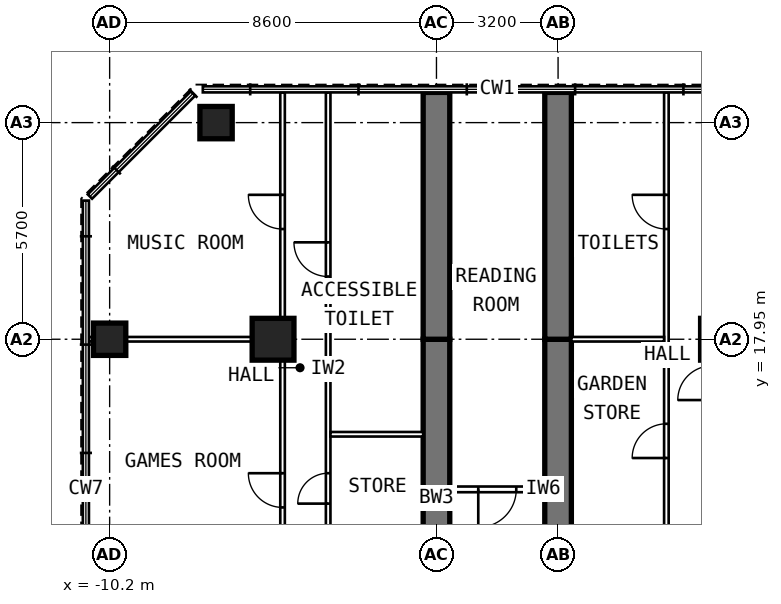
"""IFC4 building model, lengths in metres.
Left out: names, types, materials, properties, quantities, classifications, styles, units other than length and angle.
Written with IfcOpenShell. Run it as: python <this file> out.ifc"""

import sys

from ifc_helpers import new_model, si_unit, direction, frame, frame_2d, origin, origin_2d, place, context, subcontext, project, spatial, rectangle, extrude, element, fill, save


model = new_model("IFC4")
c1 = context("Model", 3, precision=1e-05, world=origin(), true_north=direction((0.0, 1.0)))
c2 = subcontext(c1, "Body", "Model", "MODEL_VIEW")
j1 = project(units=[si_unit("LENGTHUNIT", "METRE"), si_unit("PLANEANGLEUNIT", "RADIAN")], contexts=[c1])
p1 = place(None, origin())
s1 = spatial("IfcSite", under=j1, at=p1, CompositionType="ELEMENT")
p2 = place(p1, origin())
s2 = spatial("IfcBuilding", under=s1, at=p2, CompositionType="ELEMENT")
p3 = place(p2, frame((0.0, 0.0, 226.2)))
s3 = spatial("IfcBuildingStorey", under=s2, at=p3, CompositionType="ELEMENT", Elevation=226.2)
for number, where, z_axis, x_axis in (
    (1, (-10.2, 17.95, 0.0), (0.0, 0.0, 1.0), (0.0, 1.0, 0.0)),
    (2, (-7.4, 23.65, 0.0), (0.0, 0.0, 1.0), (0.0, 1.0, 0.0)),
):
    element("IfcColumn", number, at=place(p3, frame(where, z_axis=z_axis, x_axis=x_axis)), inside=s3, PredefinedType="COLUMN", context=c2, shape_type="SweptSolid", body=[
        extrude(rectangle(XDim=0.85, YDim=0.85, at=origin_2d()), origin(), (0.0, 0.0, 1.0), 5.4),
    ])
for number, where, z_axis, x_axis in (
    (3, (-5.9, 17.95, 0.0), (0.0, 0.0, 1.0), (0.0, 1.0, 0.0)),
    (4, (5.9, 17.95, 0.0), (0.0, 0.0, 1.0), (0.0, 1.0, 0.0)),
):
    element("IfcColumn", number, at=place(p3, frame(where, z_axis=z_axis, x_axis=x_axis)), inside=s3, PredefinedType="COLUMN", context=c2, shape_type="SweptSolid", body=[
        extrude(rectangle(XDim=1.1, YDim=1.1, at=origin_2d()), origin(), (0.0, 0.0, 1.0), 5.4),
    ])
p4 = place(p3, frame((-1.6, 9.6, 0.0), z_axis=(0.0, 0.0, 1.0), x_axis=(0.0, 1.0, 0.0)))
e5 = element("IfcWall", 5, at=p4, inside=s3, PredefinedType="SHEAR", context=c2, shape_type="SweptSolid", body=[
    extrude(rectangle(XDim=8.35, YDim=0.7, at=frame_2d((4.175, 0.0))), origin(), (0.0, 0.0, 1.0), 5.4),
])
p5 = place(p4, frame((1.3, 0.0, 0.0)))
e6 = element("IfcOpeningElement", 6, at=p5, cuts=e5, PredefinedType="OPENING", context=c2, shape_type="SweptSolid", body=[
    extrude(rectangle(XDim=1.0, YDim=2.1, at=frame_2d((0.5, 1.05))), frame((0.0, 0.362, 0.0), z_axis=(0.0, -1.0, 0.0), x_axis=(1.0, 0.0, 0.0)), (0.0, 0.0, 1.0), 0.724),
])
p6 = place(p3, frame((-1.6, 17.95, 0.0), z_axis=(0.0, 0.0, 1.0), x_axis=(0.0, 1.0, 0.0)))
e7 = element("IfcWall", 7, at=p6, inside=s3, PredefinedType="SHEAR", context=c2, shape_type="SweptSolid", body=[
    extrude(rectangle(XDim=6.495, YDim=0.7, at=frame_2d((3.248, 0.0))), origin(), (0.0, 0.0, 1.0), 5.4),
])
p7 = place(p3, frame((1.6, 9.6, 0.0), z_axis=(0.0, 0.0, 1.0), x_axis=(0.0, 1.0, 0.0)))
e8 = element("IfcWall", 8, at=p7, inside=s3, PredefinedType="SHEAR", context=c2, shape_type="SweptSolid", body=[
    extrude(rectangle(XDim=8.35, YDim=0.7, at=frame_2d((4.175, 0.0))), origin(), (0.0, 0.0, 1.0), 5.4),
])
p8 = place(p7, frame((1.3, 0.0, 0.0)))
e9 = element("IfcOpeningElement", 9, at=p8, cuts=e8, PredefinedType="OPENING", context=c2, shape_type="SweptSolid", body=[
    extrude(rectangle(XDim=1.0, YDim=2.1, at=frame_2d((0.5, 1.05))), frame((0.0, 0.362, 0.0), z_axis=(0.0, -1.0, 0.0), x_axis=(1.0, 0.0, 0.0)), (0.0, 0.0, 1.0), 0.724),
])
p9 = place(p3, frame((1.6, 17.95, 0.0), z_axis=(0.0, 0.0, 1.0), x_axis=(0.0, 1.0, 0.0)))
e10 = element("IfcWall", 10, at=p9, inside=s3, PredefinedType="SHEAR", context=c2, shape_type="SweptSolid", body=[
    extrude(rectangle(XDim=6.495, YDim=0.7, at=frame_2d((3.248, 0.0))), origin(), (0.0, 0.0, 1.0), 5.4),
])
p10 = place(p3, frame((-4.45, 9.9, 0.0), z_axis=(0.0, 0.0, 1.0), x_axis=(0.0, 1.0, 0.0)))
e11 = element("IfcWall", 11, at=p10, inside=s3, PredefinedType="PARTITIONING", context=c2, shape_type="SweptSolid", body=[
    extrude(rectangle(XDim=14.545, YDim=0.12, at=frame_2d((7.272, 0.0))), origin(), (0.0, 0.0, 1.0), 5.15),
])
p11 = place(p10, frame((1.55, 0.0, 0.0)))
e12 = element("IfcOpeningElement", 12, at=p11, cuts=e11, PredefinedType="OPENING", context=c2, shape_type="SweptSolid", body=[
    extrude(rectangle(XDim=0.9, YDim=2.1, at=frame_2d((0.45, 1.05))), frame((0.0, 0.072, 0.0), z_axis=(0.0, -1.0, 0.0), x_axis=(1.0, 0.0, 0.0)), (0.0, 0.0, 1.0), 0.144),
])
p12 = place(p10, frame((3.725, 0.0, 0.0)))
e13 = element("IfcOpeningElement", 13, at=p12, cuts=e11, PredefinedType="OPENING", context=c2, shape_type="SweptSolid", body=[
    extrude(rectangle(XDim=0.8, YDim=2.1, at=frame_2d((0.4, 1.05))), frame((0.0, 0.072, 0.0), z_axis=(0.0, -1.0, 0.0), x_axis=(1.0, 0.0, 0.0)), (0.0, 0.0, 1.0), 0.144),
])
p13 = place(p10, frame((9.7, 0.0, 0.0)))
e14 = element("IfcOpeningElement", 14, at=p13, cuts=e11, PredefinedType="OPENING", context=c2, shape_type="SweptSolid", body=[
    extrude(rectangle(XDim=0.9, YDim=2.1, at=frame_2d((0.45, 1.05))), frame((0.0, 0.072, 0.0), z_axis=(0.0, -1.0, 0.0), x_axis=(1.0, 0.0, 0.0)), (0.0, 0.0, 1.0), 0.144),
])
p14 = place(p3, frame((-5.65, 9.6, 0.0), z_axis=(0.0, 0.0, 1.0), x_axis=(0.0, 1.0, 0.0)))
e15 = element("IfcWall", 15, at=p14, inside=s3, PredefinedType="PARTITIONING", context=c2, shape_type="SweptSolid", body=[
    extrude(rectangle(XDim=14.845, YDim=0.12, at=frame_2d((7.422, 0.0))), origin(), (0.0, 0.0, 1.0), 5.15),
])
p15 = place(p14, frame((3.925, 0.0, 0.0)))
e16 = element("IfcOpeningElement", 16, at=p15, cuts=e15, PredefinedType="OPENING", context=c2, shape_type="SweptSolid", body=[
    extrude(rectangle(XDim=0.9, YDim=2.1, at=frame_2d((0.45, 1.05))), frame((0.0, 0.072, 0.0), z_axis=(0.0, -1.0, 0.0), x_axis=(1.0, 0.0, 0.0)), (0.0, 0.0, 1.0), 0.144),
])
p16 = place(p14, frame((11.25, 0.0, 0.0)))
e17 = element("IfcOpeningElement", 17, at=p16, cuts=e15, PredefinedType="OPENING", context=c2, shape_type="SweptSolid", body=[
    extrude(rectangle(XDim=0.9, YDim=2.1, at=frame_2d((0.45, 1.05))), frame((0.0, 0.072, 0.0), z_axis=(0.0, -1.0, 0.0), x_axis=(1.0, 0.0, 0.0)), (0.0, 0.0, 1.0), 0.144),
])
p17 = place(p3, frame((-5.71, 17.95, 0.0), z_axis=(0.0, 0.0, 1.0), x_axis=(-1.0, 0.0, 0.0)))
e18 = element("IfcWall", 18, at=p17, inside=s3, PredefinedType="PARTITIONING", context=c2, shape_type="SweptSolid", body=[
    extrude(rectangle(XDim=5.035, YDim=0.12, at=frame_2d((2.518, 0.0))), origin(), (0.0, 0.0, 1.0), 4.25),
])
p18 = place(p3, frame((-1.95, 15.45, 0.0), z_axis=(0.0, 0.0, 1.0), x_axis=(-1.0, 0.0, 0.0)))
e19 = element("IfcWall", 19, at=p18, inside=s3, PredefinedType="PARTITIONING", context=c2, shape_type="SweptSolid", body=[
    extrude(rectangle(XDim=2.44, YDim=0.12, at=frame_2d((1.22, 0.0))), origin(), (0.0, 0.0, 1.0), 5.15),
])
p19 = place(p3, frame((4.45, 9.9, 0.0), z_axis=(0.0, 0.0, 1.0), x_axis=(0.0, 1.0, 0.0)))
e20 = element("IfcWall", 20, at=p19, inside=s3, PredefinedType="PARTITIONING", context=c2, shape_type="SweptSolid", body=[
    extrude(rectangle(XDim=14.545, YDim=0.12, at=frame_2d((7.272, 0.0))), origin(), (0.0, 0.0, 1.0), 5.15),
])
p20 = place(p19, frame((1.55, 0.0, 0.0)))
e21 = element("IfcOpeningElement", 21, at=p20, cuts=e20, PredefinedType="OPENING", context=c2, shape_type="SweptSolid", body=[
    extrude(rectangle(XDim=0.9, YDim=2.1, at=frame_2d((0.45, 1.05))), frame((0.0, 0.072, 0.0), z_axis=(0.0, -1.0, 0.0), x_axis=(1.0, 0.0, 0.0)), (0.0, 0.0, 1.0), 0.144),
])
p21 = place(p19, frame((4.925, 0.0, 0.0)))
e22 = element("IfcOpeningElement", 22, at=p21, cuts=e20, PredefinedType="OPENING", context=c2, shape_type="SweptSolid", body=[
    extrude(rectangle(XDim=0.9, YDim=2.1, at=frame_2d((0.45, 1.05))), frame((0.0, 0.072, 0.0), z_axis=(0.0, -1.0, 0.0), x_axis=(1.0, 0.0, 0.0)), (0.0, 0.0, 1.0), 0.144),
])
p22 = place(p19, frame((10.95, 0.0, 0.0)))
e23 = element("IfcOpeningElement", 23, at=p22, cuts=e20, PredefinedType="OPENING", context=c2, shape_type="SweptSolid", body=[
    extrude(rectangle(XDim=0.9, YDim=2.1, at=frame_2d((0.45, 1.05))), frame((0.0, 0.072, 0.0), z_axis=(0.0, -1.0, 0.0), x_axis=(1.0, 0.0, 0.0)), (0.0, 0.0, 1.0), 0.144),
])
p23 = place(p3, frame((1.95, 17.95, 0.0), z_axis=(0.0, 0.0, 1.0), x_axis=(1.0, 0.0, 0.0)))
e24 = element("IfcWall", 24, at=p23, inside=s3, PredefinedType="PARTITIONING", context=c2, shape_type="SweptSolid", body=[
    extrude(rectangle(XDim=2.44, YDim=0.12, at=frame_2d((1.22, 0.0))), origin(), (0.0, 0.0, 1.0), 4.25),
])
p24 = place(p3, frame((1.25, 14.0, 0.0), z_axis=(0.0, 0.0, 1.0), x_axis=(-1.0, 0.0, 0.0)))
e25 = element("IfcWall", 25, at=p24, inside=s3, PredefinedType="PARTITIONING", context=c2, shape_type="SweptSolid", body=[
    extrude(rectangle(XDim=2.5, YDim=0.15, at=frame_2d((1.25, 0.0))), origin(), (0.0, 0.0, 1.0), 5.15),
])
p25 = place(p24, frame((0.75, 0.0, 0.0)))
e26 = element("IfcOpeningElement", 26, at=p25, cuts=e25, PredefinedType="OPENING", context=c2, shape_type="SweptSolid", body=[
    extrude(rectangle(XDim=1.0, YDim=2.1, at=frame_2d((0.5, 1.05))), frame((0.0, 0.087, 0.0), z_axis=(0.0, -1.0, 0.0), x_axis=(1.0, 0.0, 0.0)), (0.0, 0.0, 1.0), 0.174),
])
p26 = place(p15, origin())
e27 = element("IfcDoor", 27, at=p26, inside=s3, OperationType="SINGLE_SWING_RIGHT", PredefinedType="DOOR", context=c2, shape_type="SweptSolid", body=[
    extrude(rectangle(XDim=0.9, YDim=2.1, at=frame_2d((0.45, 1.05))), frame((0.0, 0.025, 0.0), z_axis=(0.0, -1.0, 0.0), x_axis=(1.0, 0.0, 0.0)), (0.0, 0.0, 1.0), 0.05),
])
fill(e16, e27)
p27 = place(p16, origin())
e28 = element("IfcDoor", 28, at=p27, inside=s3, OperationType="SINGLE_SWING_RIGHT", PredefinedType="DOOR", context=c2, shape_type="SweptSolid", body=[
    extrude(rectangle(XDim=0.9, YDim=2.1, at=frame_2d((0.45, 1.05))), frame((0.0, 0.025, 0.0), z_axis=(0.0, -1.0, 0.0), x_axis=(1.0, 0.0, 0.0)), (0.0, 0.0, 1.0), 0.05),
])
fill(e17, e28)
p28 = place(p12, origin())
e29 = element("IfcDoor", 29, at=p28, inside=s3, OperationType="SINGLE_SWING_LEFT", PredefinedType="DOOR", context=c2, shape_type="SweptSolid", body=[
    extrude(rectangle(XDim=0.8, YDim=2.1, at=frame_2d((0.4, 1.05))), frame((0.0, 0.025, 0.0), z_axis=(0.0, -1.0, 0.0), x_axis=(1.0, 0.0, 0.0)), (0.0, 0.0, 1.0), 0.05),
])
fill(e13, e29)
p29 = place(p13, origin())
e30 = element("IfcDoor", 30, at=p29, inside=s3, OperationType="SINGLE_SWING_RIGHT", PredefinedType="DOOR", context=c2, shape_type="SweptSolid", body=[
    extrude(rectangle(XDim=0.9, YDim=2.1, at=frame_2d((0.45, 1.05))), frame((0.0, 0.025, 0.0), z_axis=(0.0, -1.0, 0.0), x_axis=(1.0, 0.0, 0.0)), (0.0, 0.0, 1.0), 0.05),
])
fill(e14, e30)
p30 = place(p21, origin())
e31 = element("IfcDoor", 31, at=p30, inside=s3, OperationType="SINGLE_SWING_LEFT", PredefinedType="DOOR", context=c2, shape_type="SweptSolid", body=[
    extrude(rectangle(XDim=0.9, YDim=2.1, at=frame_2d((0.45, 1.05))), frame((0.0, 0.025, 0.0), z_axis=(0.0, -1.0, 0.0), x_axis=(1.0, 0.0, 0.0)), (0.0, 0.0, 1.0), 0.05),
])
fill(e22, e31)
p31 = place(p22, origin())
e32 = element("IfcDoor", 32, at=p31, inside=s3, OperationType="SINGLE_SWING_RIGHT", PredefinedType="DOOR", context=c2, shape_type="SweptSolid", body=[
    extrude(rectangle(XDim=0.9, YDim=2.1, at=frame_2d((0.45, 1.05))), frame((0.0, 0.025, 0.0), z_axis=(0.0, -1.0, 0.0), x_axis=(1.0, 0.0, 0.0)), (0.0, 0.0, 1.0), 0.05),
])
fill(e23, e32)
p32 = place(p25, origin())
e33 = element("IfcDoor", 33, at=p32, inside=s3, OperationType="SINGLE_SWING_RIGHT", PredefinedType="DOOR", context=c2, shape_type="SweptSolid", body=[
    extrude(rectangle(XDim=1.0, YDim=2.1, at=frame_2d((0.5, 1.05))), frame((0.0, 0.025, 0.0), z_axis=(0.0, -1.0, 0.0), x_axis=(1.0, 0.0, 0.0)), (0.0, 0.0, 1.0), 0.05),
])
fill(e26, e33)
save(model, sys.argv[1])
